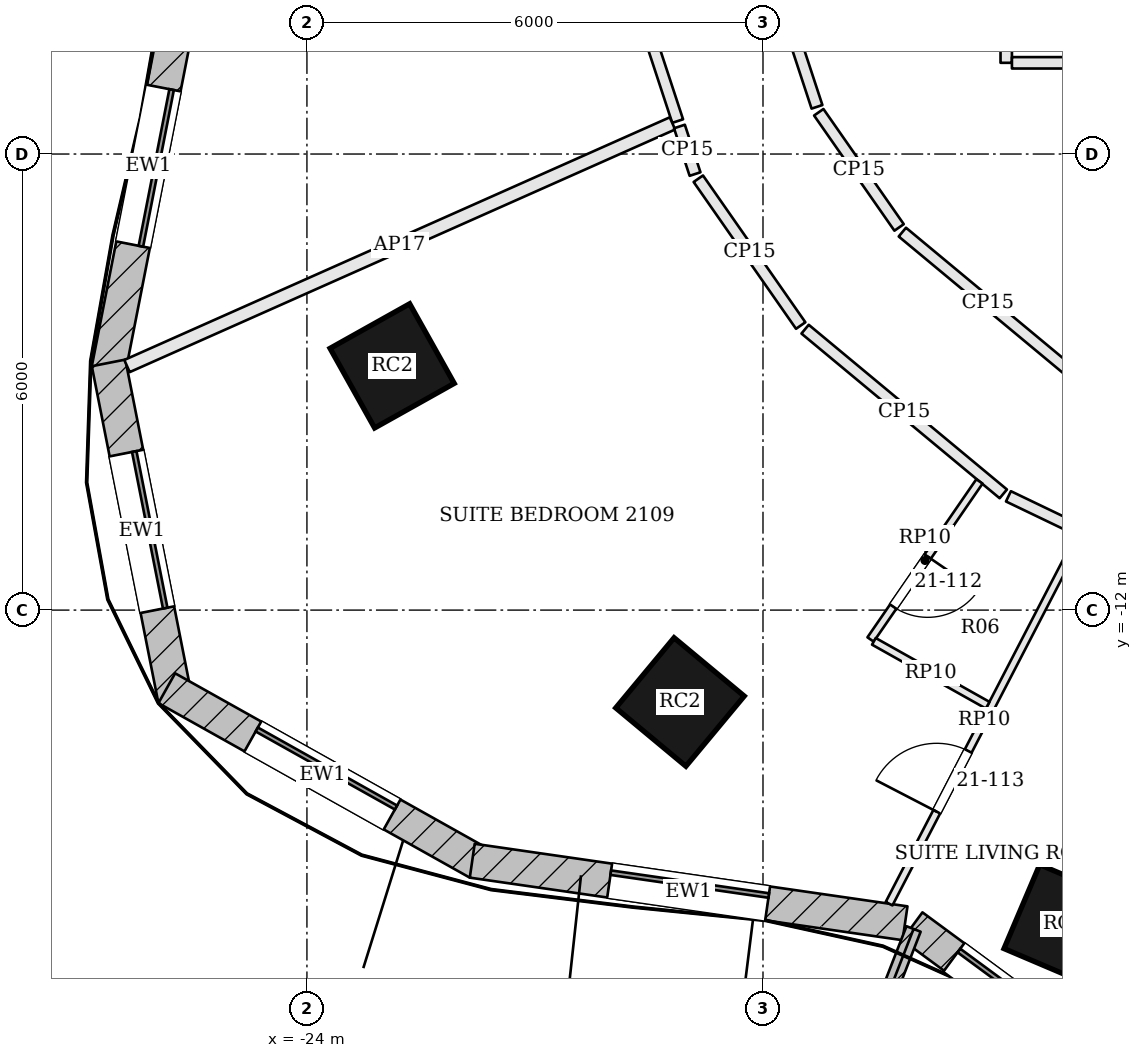
"""IFC4 building model, lengths in metres.
Left out: names, types, materials, properties, quantities, classifications, styles, units other than length and angle.
Written with IfcOpenShell. Run it as: python <this file> out.ifc"""

import sys

from ifc_helpers import new_model, si_unit, direction, frame, frame_2d, origin, origin_2d, place, context, subcontext, project, spatial, rectangle, extrude, element, fill, save


model = new_model("IFC4")
c1 = context("Model", 3, precision=1e-05, world=origin(), true_north=direction((0.0, 1.0)))
c2 = subcontext(c1, "Body", "Model", "MODEL_VIEW")
j1 = project(units=[si_unit("LENGTHUNIT", "METRE"), si_unit("PLANEANGLEUNIT", "RADIAN")], contexts=[c1])
p1 = place(None, origin())
s1 = spatial("IfcSite", under=j1, at=p1, CompositionType="ELEMENT")
p2 = place(p1, origin())
s2 = spatial("IfcBuilding", under=s1, at=p2, CompositionType="ELEMENT")
p3 = place(p2, frame((0.0, 0.0, 92.4)))
s3 = spatial("IfcBuildingStorey", under=s2, at=p3, CompositionType="ELEMENT", Elevation=92.4)
for number, where, z_axis, x_axis in (
    (1, (-22.879, -8.787, 0.0), (0.0, 0.0, 1.0), (0.489, -0.873, 0.0)),
    (2, (-19.092, -13.209, 0.0), (0.0, 0.0, 1.0), (0.769, -0.639, 0.0)),
    (3, (-14.042, -16.136, 0.0), (0.0, 0.0, 1.0), (0.92, -0.392, 0.0)),
):
    element("IfcColumn", number, at=place(p3, frame(where, z_axis=z_axis, x_axis=x_axis)), inside=s3, PredefinedType="COLUMN", context=c2, shape_type="SweptSolid", body=[
        extrude(rectangle(XDim=1.2, YDim=1.2, at=origin_2d()), origin(), (0.0, 0.0, 1.0), 3.6),
    ])
p4 = place(p3, frame((-25.561, -3.49, 0.0), z_axis=(0.0, 0.0, 1.0), x_axis=(-0.192494026297, -0.981298145234, 0.0)))
e4 = element("IfcWall", 4, at=p4, inside=s3, PredefinedType="SOLIDWALL", context=c2, shape_type="SweptSolid", body=[
    extrude(rectangle(XDim=5.446, YDim=0.45, at=frame_2d((2.723, 0.0))), origin(), (0.0, 0.0, 1.0), 3.4),
])
p5 = place(p4, frame((1.673, 0.0, 0.9)))
e5 = element("IfcOpeningElement", 5, at=p5, cuts=e4, PredefinedType="OPENING", context=c2, shape_type="SweptSolid", body=[
    extrude(rectangle(XDim=2.1, YDim=2.0, at=frame_2d((1.05, 1.0))), frame((0.0, 0.235, 0.0), z_axis=(0.0, -1.0, 0.0), x_axis=(1.0, 0.0, 0.0)), (0.0, 0.0, 1.0), 0.47),
])
p6 = place(p3, frame((-26.61, -8.748, 0.0), z_axis=(0.0, 0.0, 1.0), x_axis=(0.193923166402, -0.981016720312, 0.0)))
e6 = element("IfcWall", 6, at=p6, inside=s3, PredefinedType="SOLIDWALL", context=c2, shape_type="SweptSolid", body=[
    extrude(rectangle(XDim=4.518, YDim=0.45, at=frame_2d((2.259, 0.0))), origin(), (0.0, 0.0, 1.0), 3.4),
])
p7 = place(p6, frame((1.209, 0.0, 0.9)))
e7 = element("IfcOpeningElement", 7, at=p7, cuts=e6, PredefinedType="OPENING", context=c2, shape_type="SweptSolid", body=[
    extrude(rectangle(XDim=2.1, YDim=2.0, at=frame_2d((1.05, 1.0))), frame((0.0, 0.235, 0.0), z_axis=(0.0, -1.0, 0.0), x_axis=(1.0, 0.0, 0.0)), (0.0, 0.0, 1.0), 0.47),
])
p8 = place(p3, frame((-25.844, -13.028, 0.0), z_axis=(0.0, 0.0, 1.0), x_axis=(0.872346398261, -0.488888291373, 0.0)))
e8 = element("IfcWall", 8, at=p8, inside=s3, PredefinedType="SOLIDWALL", context=c2, shape_type="SweptSolid", body=[
    extrude(rectangle(XDim=4.696, YDim=0.45, at=frame_2d((2.348, 0.0))), origin(), (0.0, 0.0, 1.0), 3.4),
])
p9 = place(p8, frame((1.298, 0.0, 0.9)))
e9 = element("IfcOpeningElement", 9, at=p9, cuts=e8, PredefinedType="OPENING", context=c2, shape_type="SweptSolid", body=[
    extrude(rectangle(XDim=2.1, YDim=2.0, at=frame_2d((1.05, 1.0))), frame((0.0, 0.235, 0.0), z_axis=(0.0, -1.0, 0.0), x_axis=(1.0, 0.0, 0.0)), (0.0, 0.0, 1.0), 0.47),
])
p10 = place(p3, frame((-21.825, -15.297, 0.0), z_axis=(0.0, 0.0, 1.0), x_axis=(0.98971474215, -0.143054986527, 0.0)))
e10 = element("IfcWall", 10, at=p10, inside=s3, PredefinedType="SOLIDWALL", context=c2, shape_type="SweptSolid", body=[
    extrude(rectangle(XDim=5.753, YDim=0.45, at=frame_2d((2.876, 0.0))), origin(), (0.0, 0.0, 1.0), 3.4),
])
p11 = place(p10, frame((1.826, 0.0, 0.9)))
e11 = element("IfcOpeningElement", 11, at=p11, cuts=e10, PredefinedType="OPENING", context=c2, shape_type="SweptSolid", body=[
    extrude(rectangle(XDim=2.1, YDim=2.0, at=frame_2d((1.05, 1.0))), frame((0.0, 0.235, 0.0), z_axis=(0.0, -1.0, 0.0), x_axis=(1.0, 0.0, 0.0)), (0.0, 0.0, 1.0), 0.47),
])
p12 = place(p3, frame((-16.036, -16.158, 0.0), z_axis=(0.0, 0.0, 1.0), x_axis=(0.805181432967, -0.593028549064, 0.0)))
e12 = element("IfcWall", 12, at=p12, inside=s3, PredefinedType="SOLIDWALL", context=c2, shape_type="SweptSolid", body=[
    extrude(rectangle(XDim=3.469, YDim=0.45, at=frame_2d((1.734, 0.0))), origin(), (0.0, 0.0, 1.0), 3.4),
])
p13 = place(p12, frame((0.684, 0.0, 0.9)))
e13 = element("IfcOpeningElement", 13, at=p13, cuts=e12, PredefinedType="OPENING", context=c2, shape_type="SweptSolid", body=[
    extrude(rectangle(XDim=2.1, YDim=2.0, at=frame_2d((1.05, 1.0))), frame((0.0, 0.235, 0.0), z_axis=(0.0, -1.0, 0.0), x_axis=(1.0, 0.0, 0.0)), (0.0, 0.0, 1.0), 0.47),
])
p14 = place(p3, frame((-16.019, -16.195, 0.0), z_axis=(0.0, 0.0, 1.0), x_axis=(-0.362641522028, -0.931928713208, 0.0)))
e14 = element("IfcWall", 14, at=p14, inside=s3, PredefinedType="SOLIDWALL", context=c2, shape_type="SweptSolid", body=[
    extrude(rectangle(XDim=1.75, YDim=0.2, at=frame_2d((0.875, 0.0))), origin(), (0.0, 0.0, 1.0), 3.4),
])
p15 = place(p3, frame((-19.914, -3.157, 0.0), z_axis=(0.0, 0.0, 1.0), x_axis=(0.312037873477, -0.950069663507, 0.0)))
e15 = element("IfcWall", 15, at=p15, inside=s3, PredefinedType="PARTITIONING", context=c2, shape_type="SweptSolid", body=[
    extrude(rectangle(XDim=2.537, YDim=0.15, at=frame_2d((1.268, 0.0))), origin(), (0.0, 0.0, 1.0), 2.784),
])
p16 = place(p3, frame((-26.367, -8.789, 0.0), z_axis=(0.0, 0.0, 1.0), x_axis=(0.913674334345, 0.406447057756, 0.0)))
e16 = element("IfcWall", 16, at=p16, inside=s3, PredefinedType="PARTITIONING", context=c2, shape_type="SweptSolid", body=[
    extrude(rectangle(XDim=7.854, YDim=0.175, at=frame_2d((3.927, 0.0))), origin(), (0.0, 0.0, 1.0), 2.784),
])
p17 = place(p3, frame((-19.099, -5.638, 0.0), z_axis=(0.0, 0.0, 1.0), x_axis=(0.312220223489, -0.950009753657, 0.0)))
e17 = element("IfcWall", 17, at=p17, inside=s3, PredefinedType="PARTITIONING", context=c2, shape_type="SweptSolid", body=[
    extrude(rectangle(XDim=0.658, YDim=0.15, at=frame_2d((0.329, 0.0))), origin(), (0.0, 0.0, 1.0), 2.784),
])
p18 = place(p3, frame((-18.851, -6.325, 0.0), z_axis=(0.0, 0.0, 1.0), x_axis=(0.572090775968, -0.820190309656, 0.0)))
e18 = element("IfcWall", 18, at=p18, inside=s3, PredefinedType="PARTITIONING", context=c2, shape_type="SweptSolid", body=[
    extrude(rectangle(XDim=2.355, YDim=0.15, at=frame_2d((1.177, 0.0))), origin(), (0.0, 0.0, 1.0), 2.784),
])
p19 = place(p3, frame((-17.446, -8.304, 0.0), z_axis=(0.0, 0.0, 1.0), x_axis=(0.769200174495, -0.639007896318, 0.0)))
e19 = element("IfcWall", 19, at=p19, inside=s3, PredefinedType="PARTITIONING", context=c2, shape_type="SweptSolid", body=[
    extrude(rectangle(XDim=3.39, YDim=0.15, at=frame_2d((1.695, 0.0))), origin(), (0.0, 0.0, 1.0), 2.784),
])
p20 = place(p3, frame((-14.771, -10.503, 0.0), z_axis=(0.0, 0.0, 1.0), x_axis=(0.901503349553, -0.432772123346, 0.0)))
e20 = element("IfcWall", 20, at=p20, inside=s3, PredefinedType="PARTITIONING", context=c2, shape_type="SweptSolid", body=[
    extrude(rectangle(XDim=3.673, YDim=0.15, at=frame_2d((1.836, 0.0))), origin(), (0.0, 0.0, 1.0), 2.784),
])
p21 = place(p20, frame((2.092, 0.0, 0.0)))
e21 = element("IfcOpeningElement", 21, at=p21, cuts=e20, PredefinedType="OPENING", context=c2, shape_type="SweptSolid", body=[
    extrude(rectangle(XDim=1.0, YDim=2.1, at=frame_2d((0.5, 1.05))), frame((0.0, 0.085, 0.0), z_axis=(0.0, -1.0, 0.0), x_axis=(1.0, 0.0, 0.0)), (0.0, 0.0, 1.0), 0.17),
])
p22 = place(p3, frame((-13.917, -8.896, 0.0), z_axis=(0.0, 0.0, 1.0), x_axis=(-0.769130409479, 0.639091866021, 0.0)))
e22 = element("IfcWall", 22, at=p22, inside=s3, PredefinedType="PARTITIONING", context=c2, shape_type="SweptSolid", body=[
    extrude(rectangle(XDim=2.925, YDim=0.15, at=frame_2d((1.462, 0.0))), origin(), (0.0, 0.0, 1.0), 2.784),
])
p23 = place(p3, frame((-16.209, -6.966, 0.0), z_axis=(0.0, 0.0, 1.0), x_axis=(-0.572051367607, 0.820217795966, 0.0)))
e23 = element("IfcWall", 23, at=p23, inside=s3, PredefinedType="PARTITIONING", context=c2, shape_type="SweptSolid", body=[
    extrude(rectangle(XDim=1.848, YDim=0.15, at=frame_2d((0.924, 0.0))), origin(), (0.0, 0.0, 1.0), 2.784),
])
p24 = place(p3, frame((-17.29, -5.379, 0.0), z_axis=(0.0, 0.0, 1.0), x_axis=(-0.312009486843, 0.950078986253, 0.0)))
e24 = element("IfcWall", 24, at=p24, inside=s3, PredefinedType="PARTITIONING", context=c2, shape_type="SweptSolid", body=[
    extrude(rectangle(XDim=2.78, YDim=0.15, at=frame_2d((1.39, 0.0))), origin(), (0.0, 0.0, 1.0), 2.784),
])
p25 = place(p3, frame((-14.8, 8.148, 0.0), z_axis=(0.0, 0.0, 1.0), x_axis=(0.0, -1.0, 0.0)))
e25 = element("IfcWall", 25, at=p25, inside=s3, PredefinedType="PARTITIONING", context=c2, shape_type="SweptSolid", body=[
    extrude(rectangle(XDim=12.948, YDim=0.15, at=frame_2d((6.474, 0.0))), origin(), (0.0, 0.0, 1.0), 2.784),
])
p26 = place(p25, frame((5.687, 0.0, 0.0)))
e26 = element("IfcOpeningElement", 26, at=p26, cuts=e25, PredefinedType="OPENING", context=c2, shape_type="SweptSolid", body=[
    extrude(rectangle(XDim=0.7, YDim=2.1, at=frame_2d((0.35, 1.05))), frame((0.0, 0.085, 0.0), z_axis=(0.0, -1.0, 0.0), x_axis=(1.0, 0.0, 0.0)), (0.0, 0.0, 1.0), 0.17),
])
p27 = place(p3, frame((-14.725, -4.8, 0.0), z_axis=(0.0, 0.0, 1.0), x_axis=(1.0, 0.0, 0.0)))
e27 = element("IfcWall", 27, at=p27, inside=s3, PredefinedType="PARTITIONING", context=c2, shape_type="SweptSolid", body=[
    extrude(rectangle(XDim=29.525, YDim=0.15, at=frame_2d((14.763, 0.0))), origin(), (0.0, 0.0, 1.0), 2.784),
])
p28 = place(p27, frame((2.075, 0.0, 0.0)))
e28 = element("IfcOpeningElement", 28, at=p28, cuts=e27, PredefinedType="OPENING", context=c2, shape_type="SweptSolid", body=[
    extrude(rectangle(XDim=1.0, YDim=2.1, at=frame_2d((0.5, 1.05))), frame((0.0, 0.085, 0.0), z_axis=(0.0, -1.0, 0.0), x_axis=(1.0, 0.0, 0.0)), (0.0, 0.0, 1.0), 0.17),
])
p29 = place(p27, frame((13.825, 0.0, 0.0)))
e29 = element("IfcOpeningElement", 29, at=p29, cuts=e27, PredefinedType="OPENING", context=c2, shape_type="SweptSolid", body=[
    extrude(rectangle(XDim=1.8, YDim=2.1, at=frame_2d((0.9, 1.05))), frame((0.0, 0.085, 0.0), z_axis=(0.0, -1.0, 0.0), x_axis=(1.0, 0.0, 0.0)), (0.0, 0.0, 1.0), 0.17),
])
p30 = place(p27, frame((26.525, 0.0, 0.0)))
e30 = element("IfcOpeningElement", 30, at=p30, cuts=e27, PredefinedType="OPENING", context=c2, shape_type="SweptSolid", body=[
    extrude(rectangle(XDim=0.7, YDim=2.1, at=frame_2d((0.35, 1.05))), frame((0.0, 0.085, 0.0), z_axis=(0.0, -1.0, 0.0), x_axis=(1.0, 0.0, 0.0)), (0.0, 0.0, 1.0), 0.17),
])
p31 = place(p3, frame((-16.341, -15.862, 0.0), z_axis=(0.0, 0.0, 1.0), x_axis=(0.460149427678, 0.887841485969, 0.0)))
e31 = element("IfcWall", 31, at=p31, inside=s3, PredefinedType="PARTITIONING", context=c2, shape_type="SweptSolid", body=[
    extrude(rectangle(XDim=5.438, YDim=0.1, at=frame_2d((2.719, 0.0))), origin(), (0.0, 0.0, 1.0), 2.884),
])
p32 = place(p31, frame((1.363, 0.0, 0.0)))
e32 = element("IfcOpeningElement", 32, at=p32, cuts=e31, PredefinedType="OPENING", context=c2, shape_type="SweptSolid", body=[
    extrude(rectangle(XDim=0.9, YDim=2.4, at=frame_2d((0.45, 1.2))), frame((0.0, 0.06, 0.0), z_axis=(0.0, -1.0, 0.0), x_axis=(1.0, 0.0, 0.0)), (0.0, 0.0, 1.0), 0.12),
])
p33 = place(p3, frame((-15.152, -10.307, 0.0), z_axis=(0.0, 0.0, 1.0), x_axis=(-0.567242581317, -0.823550759784, 0.0)))
e33 = element("IfcWall", 33, at=p33, inside=s3, PredefinedType="PARTITIONING", context=c2, shape_type="SweptSolid", body=[
    extrude(rectangle(XDim=2.525, YDim=0.1, at=frame_2d((1.263, 0.0))), origin(), (0.0, 0.0, 1.0), 2.884),
])
p34 = place(p33, frame((1.2, 0.0, 0.0)))
e34 = element("IfcOpeningElement", 34, at=p34, cuts=e33, PredefinedType="OPENING", context=c2, shape_type="SweptSolid", body=[
    extrude(rectangle(XDim=0.8, YDim=2.1, at=frame_2d((0.4, 1.05))), frame((0.0, 0.06, 0.0), z_axis=(0.0, -1.0, 0.0), x_axis=(1.0, 0.0, 0.0)), (0.0, 0.0, 1.0), 0.12),
])
p35 = place(p3, frame((-16.541, -12.411, 0.0), z_axis=(0.0, 0.0, 1.0), x_axis=(0.872042364088, -0.489430398765, 0.0)))
e35 = element("IfcWall", 35, at=p35, inside=s3, PredefinedType="PARTITIONING", context=c2, shape_type="SweptSolid", body=[
    extrude(rectangle(XDim=1.717, YDim=0.1, at=frame_2d((0.858, 0.0))), origin(), (0.0, 0.0, 1.0), 2.884),
])
p36 = place(p5, origin())
e36 = element("IfcWindow", 36, at=p36, inside=s3, PartitioningType="SINGLE_PANEL", PredefinedType="WINDOW", context=c2, shape_type="SweptSolid", body=[
    extrude(rectangle(XDim=2.1, YDim=2.0, at=frame_2d((1.05, 1.0))), frame((0.0, 0.135, 0.0), z_axis=(0.0, -1.0, 0.0), x_axis=(1.0, 0.0, 0.0)), (0.0, 0.0, 1.0), 0.06),
])
fill(e5, e36)
p37 = place(p7, origin())
e37 = element("IfcWindow", 37, at=p37, inside=s3, PartitioningType="SINGLE_PANEL", PredefinedType="WINDOW", context=c2, shape_type="SweptSolid", body=[
    extrude(rectangle(XDim=2.1, YDim=2.0, at=frame_2d((1.05, 1.0))), frame((0.0, 0.135, 0.0), z_axis=(0.0, -1.0, 0.0), x_axis=(1.0, 0.0, 0.0)), (0.0, 0.0, 1.0), 0.06),
])
fill(e7, e37)
p38 = place(p9, origin())
e38 = element("IfcWindow", 38, at=p38, inside=s3, PartitioningType="SINGLE_PANEL", PredefinedType="WINDOW", context=c2, shape_type="SweptSolid", body=[
    extrude(rectangle(XDim=2.1, YDim=2.0, at=frame_2d((1.05, 1.0))), frame((0.0, 0.135, 0.0), z_axis=(0.0, -1.0, 0.0), x_axis=(1.0, 0.0, 0.0)), (0.0, 0.0, 1.0), 0.06),
])
fill(e9, e38)
p39 = place(p11, origin())
e39 = element("IfcWindow", 39, at=p39, inside=s3, PartitioningType="SINGLE_PANEL", PredefinedType="WINDOW", context=c2, shape_type="SweptSolid", body=[
    extrude(rectangle(XDim=2.1, YDim=2.0, at=frame_2d((1.05, 1.0))), frame((0.0, 0.135, 0.0), z_axis=(0.0, -1.0, 0.0), x_axis=(1.0, 0.0, 0.0)), (0.0, 0.0, 1.0), 0.06),
])
fill(e11, e39)
p40 = place(p13, origin())
e40 = element("IfcWindow", 40, at=p40, inside=s3, PartitioningType="SINGLE_PANEL", PredefinedType="WINDOW", context=c2, shape_type="SweptSolid", body=[
    extrude(rectangle(XDim=2.1, YDim=2.0, at=frame_2d((1.05, 1.0))), frame((0.0, 0.135, 0.0), z_axis=(0.0, -1.0, 0.0), x_axis=(1.0, 0.0, 0.0)), (0.0, 0.0, 1.0), 0.06),
])
fill(e13, e40)
p41 = place(p34, origin())
e41 = element("IfcDoor", 41, at=p41, inside=s3, OperationType="SINGLE_SWING_LEFT", PredefinedType="DOOR", context=c2, shape_type="SweptSolid", body=[
    extrude(rectangle(XDim=0.8, YDim=2.1, at=frame_2d((0.4, 1.05))), frame((0.0, 0.025, 0.0), z_axis=(0.0, -1.0, 0.0), x_axis=(1.0, 0.0, 0.0)), (0.0, 0.0, 1.0), 0.05),
])
fill(e34, e41)
p42 = place(p32, origin())
e42 = element("IfcDoor", 42, at=p42, inside=s3, OperationType="SINGLE_SWING_LEFT", PredefinedType="DOOR", context=c2, shape_type="SweptSolid", body=[
    extrude(rectangle(XDim=0.9, YDim=2.4, at=frame_2d((0.45, 1.2))), frame((0.0, 0.025, 0.0), z_axis=(0.0, -1.0, 0.0), x_axis=(1.0, 0.0, 0.0)), (0.0, 0.0, 1.0), 0.05),
])
fill(e32, e42)
save(model, sys.argv[1])
